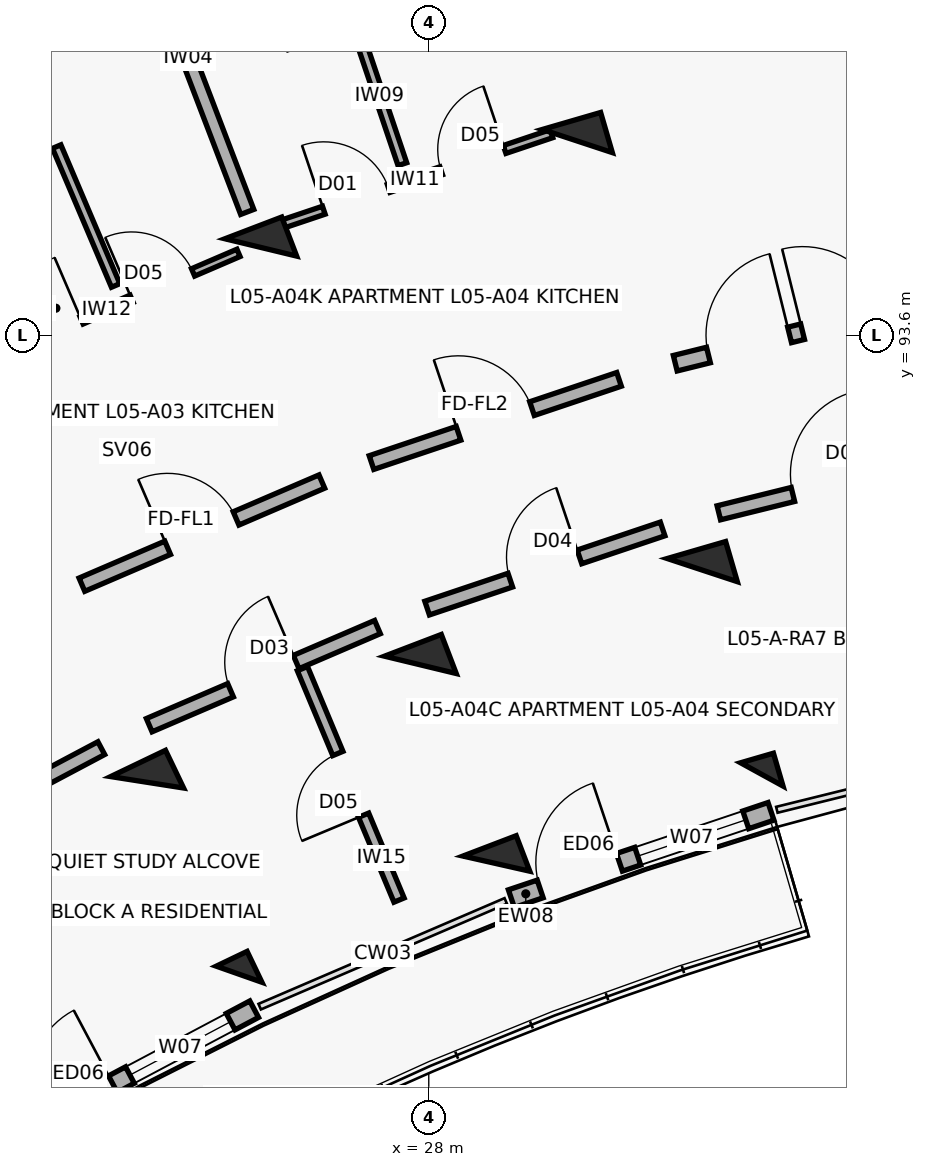
"""IFC4 building model, lengths in metres.
Left out: names, types, materials, properties, quantities, classifications, styles, units other than length and angle.
Written with IfcOpenShell. Run it as: python <this file> out.ifc"""

import sys

from ifc_helpers import new_model, si_unit, direction, frame, frame_2d, origin, origin_2d, place, context, subcontext, project, spatial, rectangle, extrude, element, fill, save


model = new_model("IFC4")
c1 = context("Model", 3, precision=1e-05, world=origin(), true_north=direction((0.0, 1.0)))
c2 = subcontext(c1, "Body", "Model", "MODEL_VIEW")
j1 = project(units=[si_unit("LENGTHUNIT", "METRE"), si_unit("PLANEANGLEUNIT", "RADIAN")], contexts=[c1])
p1 = place(None, origin())
s1 = spatial("IfcSite", under=j1, at=p1, CompositionType="ELEMENT")
p2 = place(p1, origin())
s2 = spatial("IfcBuilding", under=s1, at=p2, CompositionType="ELEMENT")
p3 = place(p2, frame((0.0, 0.0, 17.4)))
s3 = spatial("IfcBuildingStorey", under=s2, at=p3, CompositionType="ELEMENT", Elevation=17.4)
p4 = place(p3, frame((25.504, 85.191, 0.0), z_axis=(0.0, 0.0, 1.0), x_axis=(-0.432085748802, 0.901832526405, 0.0)))
e1 = element("IfcColumn", 1, at=p4, inside=s3, PredefinedType="COLUMN", context=c2, shape_type="SweptSolid", body=[
    extrude(rectangle(XDim=0.45, YDim=0.45, at=origin_2d()), origin(), (0.0, 0.0, 1.0), 3.1),
])
p5 = place(p3, frame((24.294, 87.716, 0.0), z_axis=(0.0, 0.0, 1.0), x_axis=(-0.432085748802, 0.901832526405, 0.0)))
e2 = element("IfcColumn", 2, at=p5, inside=s3, PredefinedType="COLUMN", context=c2, shape_type="SweptSolid", body=[
    extrude(rectangle(XDim=0.55, YDim=0.8, at=origin_2d()), origin(), (0.0, 0.0, 1.0), 3.1),
])
p6 = place(p3, frame((28.889, 86.646, 0.0), z_axis=(0.0, 0.0, 1.0), x_axis=(-0.357064076459, 0.934079892355, 0.0)))
e3 = element("IfcColumn", 3, at=p6, inside=s3, PredefinedType="COLUMN", context=c2, shape_type="SweptSolid", body=[
    extrude(rectangle(XDim=0.5, YDim=0.75, at=origin_2d()), origin(), (0.0, 0.0, 1.0), 3.1),
])
for number, where, z_axis, x_axis in (
    (4, (27.889, 89.261, 0.0), (0.0, 0.0, 1.0), (-0.357, 0.934, 0.0)),
    (5, (25.79, 94.753, 0.0), (0.0, 0.0, 1.0), (-0.357, 0.934, 0.0)),
):
    element("IfcColumn", number, at=place(p3, frame(where, z_axis=z_axis, x_axis=x_axis)), inside=s3, PredefinedType="COLUMN", context=c2, shape_type="SweptSolid", body=[
        extrude(rectangle(XDim=0.55, YDim=0.8, at=origin_2d()), origin(), (0.0, 0.0, 1.0), 3.1),
    ])
p7 = place(p3, frame((32.382, 87.82, 0.0), z_axis=(0.0, 0.0, 1.0), x_axis=(-0.27966144946, 0.96009867914, 0.0)))
e6 = element("IfcColumn", 6, at=p7, inside=s3, PredefinedType="COLUMN", context=c2, shape_type="SweptSolid", body=[
    extrude(rectangle(XDim=0.45, YDim=0.45, at=origin_2d()), origin(), (0.0, 0.0, 1.0), 3.1),
])
for number, where, z_axis, x_axis in (
    (7, (31.599, 90.508, 0.0), (0.0, 0.0, 1.0), (-0.28, 0.96, 0.0)),
    (8, (29.954, 96.153, 0.0), (0.0, 0.0, 1.0), (-0.28, 0.96, 0.0)),
):
    element("IfcColumn", number, at=place(p3, frame(where, z_axis=z_axis, x_axis=x_axis)), inside=s3, PredefinedType="COLUMN", context=c2, shape_type="SweptSolid", body=[
        extrude(rectangle(XDim=0.55, YDim=0.8, at=origin_2d()), origin(), (0.0, 0.0, 1.0), 3.1),
    ])
p8 = place(p3, frame((22.519, 83.042, 0.0), z_axis=(0.0, 0.0, 1.0), x_axis=(0.883438308286, 0.468547495407, 0.0)))
e9 = element("IfcWall", 9, at=p8, inside=s3, PredefinedType="SOLIDWALL", context=c2, shape_type="SweptSolid", body=[
    extrude(rectangle(XDim=3.604, YDim=0.245, at=frame_2d((1.802, 0.0))), origin(), (0.0, 0.0, 1.0), 2.25),
])
p9 = place(p8, frame((0.4, 0.0, 0.0)))
e10 = element("IfcOpeningElement", 10, at=p9, cuts=e9, PredefinedType="OPENING", context=c2, shape_type="SweptSolid", body=[
    extrude(rectangle(XDim=1.1, YDim=2.15, at=frame_2d((0.55, 1.075))), frame((0.0, 0.133, 0.0), z_axis=(0.0, -1.0, 0.0), x_axis=(1.0, 0.0, 0.0)), (0.0, 0.0, 1.0), 0.265),
])
p10 = place(p8, frame((1.754, 0.0, 0.35)))
e11 = element("IfcOpeningElement", 11, at=p10, cuts=e9, PredefinedType="OPENING", context=c2, shape_type="SweptSolid", body=[
    extrude(rectangle(XDim=1.5, YDim=1.65, at=frame_2d((0.75, 0.825))), frame((0.0, 0.133, 0.0), z_axis=(0.0, -1.0, 0.0), x_axis=(1.0, 0.0, 0.0)), (0.0, 0.0, 1.0), 0.265),
])
p11 = place(p3, frame((29.087, 86.185, 0.0), z_axis=(0.0, 0.0, 1.0), x_axis=(0.947880824442, 0.318625081649, 0.0)))
e12 = element("IfcWall", 12, at=p11, inside=s3, PredefinedType="SOLIDWALL", context=c2, shape_type="SweptSolid", body=[
    extrude(rectangle(XDim=3.604, YDim=0.245, at=frame_2d((1.802, 0.0))), origin(), (0.0, 0.0, 1.0), 2.25),
])
p12 = place(p11, frame((0.4, 0.0, 0.0)))
e13 = element("IfcOpeningElement", 13, at=p12, cuts=e12, PredefinedType="OPENING", context=c2, shape_type="SweptSolid", body=[
    extrude(rectangle(XDim=1.1, YDim=2.15, at=frame_2d((0.55, 1.075))), frame((0.0, 0.133, 0.0), z_axis=(0.0, -1.0, 0.0), x_axis=(1.0, 0.0, 0.0)), (0.0, 0.0, 1.0), 0.265),
])
p13 = place(p11, frame((1.754, 0.0, 0.35)))
e14 = element("IfcOpeningElement", 14, at=p13, cuts=e12, PredefinedType="OPENING", context=c2, shape_type="SweptSolid", body=[
    extrude(rectangle(XDim=1.5, YDim=1.65, at=frame_2d((0.75, 0.825))), frame((0.0, 0.133, 0.0), z_axis=(0.0, -1.0, 0.0), x_axis=(1.0, 0.0, 0.0)), (0.0, 0.0, 1.0), 0.265),
])
p14 = place(p3, frame((20.804, 86.634, 0.0), z_axis=(0.0, 0.0, 1.0), x_axis=(0.883444301944, 0.468536194293, 0.0)))
e15 = element("IfcWall", 15, at=p14, inside=s3, PredefinedType="SOLIDWALL", context=c2, shape_type="SweptSolid", body=[
    extrude(rectangle(XDim=3.269, YDim=0.19, at=frame_2d((1.634, 0.0))), origin(), (0.0, 0.0, 1.0), 2.08),
])
p15 = place(p14, frame((1.174, 0.0, 0.0)))
e16 = element("IfcOpeningElement", 16, at=p15, cuts=e15, PredefinedType="OPENING", context=c2, shape_type="SweptSolid", body=[
    extrude(rectangle(XDim=0.92, YDim=2.1, at=frame_2d((0.46, 1.05))), frame((0.0, 0.105, 0.0), z_axis=(0.0, -1.0, 0.0), x_axis=(1.0, 0.0, 0.0)), (0.0, 0.0, 1.0), 0.21),
])
p16 = place(p3, frame((23.437, 90.316, 0.0), z_axis=(0.0, 0.0, 1.0), x_axis=(0.918718172399, 0.394913813008, 0.0)))
e17 = element("IfcWall", 17, at=p16, inside=s3, PredefinedType="SOLIDWALL", context=c2, shape_type="SweptSolid", body=[
    extrude(rectangle(XDim=3.436, YDim=0.19, at=frame_2d((1.718, 0.0))), origin(), (0.0, 0.0, 1.0), 2.08),
])
p17 = place(p16, frame((1.228, 0.0, 0.0)))
e18 = element("IfcOpeningElement", 18, at=p17, cuts=e17, PredefinedType="OPENING", context=c2, shape_type="SweptSolid", body=[
    extrude(rectangle(XDim=0.98, YDim=2.15, at=frame_2d((0.49, 1.075))), frame((0.0, 0.105, 0.0), z_axis=(0.0, -1.0, 0.0), x_axis=(1.0, 0.0, 0.0)), (0.0, 0.0, 1.0), 0.21),
])
p18 = place(p3, frame((24.322, 88.467, 0.0), z_axis=(0.0, 0.0, 1.0), x_axis=(0.918723391052, 0.394901672235, 0.0)))
e19 = element("IfcWall", 19, at=p18, inside=s3, PredefinedType="SOLIDWALL", context=c2, shape_type="SweptSolid", body=[
    extrude(rectangle(XDim=3.269, YDim=0.19, at=frame_2d((1.634, 0.0))), origin(), (0.0, 0.0, 1.0), 2.08),
])
p19 = place(p18, frame((1.164, 0.0, 0.0)))
e20 = element("IfcOpeningElement", 20, at=p19, cuts=e19, PredefinedType="OPENING", context=c2, shape_type="SweptSolid", body=[
    extrude(rectangle(XDim=0.94, YDim=2.1, at=frame_2d((0.47, 1.05))), frame((0.0, 0.105, 0.0), z_axis=(0.0, -1.0, 0.0), x_axis=(1.0, 0.0, 0.0)), (0.0, 0.0, 1.0), 0.21),
])
p20 = place(p3, frame((27.609, 86.166, 0.0), z_axis=(0.0, 0.0, 1.0), x_axis=(-0.385151143297, 0.922853507777, 0.0)))
e21 = element("IfcWall", 21, at=p20, inside=s3, PredefinedType="PARTITIONING", context=c2, shape_type="SweptSolid", body=[
    extrude(rectangle(XDim=3.3, YDim=0.145, at=frame_2d((1.65, 0.0))), origin(), (0.0, 0.0, 1.0), 2.08),
])
p21 = place(p20, frame((1.21, 0.0, 0.0)))
e22 = element("IfcOpeningElement", 22, at=p21, cuts=e21, PredefinedType="OPENING", context=c2, shape_type="SweptSolid", body=[
    extrude(rectangle(XDim=0.88, YDim=2.1, at=frame_2d((0.44, 1.05))), frame((0.0, 0.083, 0.0), z_axis=(0.0, -1.0, 0.0), x_axis=(1.0, 0.0, 0.0)), (0.0, 0.0, 1.0), 0.165),
])
p22 = place(p3, frame((22.008, 93.182, 0.0), z_axis=(0.0, 0.0, 1.0), x_axis=(0.918732171064, 0.394881245253, 0.0)))
e23 = element("IfcWall", 23, at=p22, inside=s3, PredefinedType="PARTITIONING", context=c2, shape_type="SweptSolid", body=[
    extrude(rectangle(XDim=3.797, YDim=0.105, at=frame_2d((1.899, 0.0))), origin(), (0.0, 0.0, 1.0), 2.08),
])
p23 = place(p22, frame((0.65, 0.0, 0.0)))
e24 = element("IfcOpeningElement", 24, at=p23, cuts=e23, PredefinedType="OPENING", context=c2, shape_type="SweptSolid", body=[
    extrude(rectangle(XDim=0.9, YDim=2.1, at=frame_2d((0.45, 1.05))), frame((0.0, 0.062, 0.0), z_axis=(0.0, -1.0, 0.0), x_axis=(1.0, 0.0, 0.0)), (0.0, 0.0, 1.0), 0.125),
])
p24 = place(p22, frame((2.267, 0.0, 0.0)))
e25 = element("IfcOpeningElement", 25, at=p24, cuts=e23, PredefinedType="OPENING", context=c2, shape_type="SweptSolid", body=[
    extrude(rectangle(XDim=0.88, YDim=2.1, at=frame_2d((0.44, 1.05))), frame((0.0, 0.062, 0.0), z_axis=(0.0, -1.0, 0.0), x_axis=(1.0, 0.0, 0.0)), (0.0, 0.0, 1.0), 0.125),
])
p25 = place(p3, frame((23.88, 94.253, 0.0), z_axis=(0.0, 0.0, 1.0), x_axis=(-0.39076607415, 0.920490019116, 0.0)))
e26 = element("IfcWall", 26, at=p25, inside=s3, PredefinedType="PARTITIONING", context=c2, shape_type="SweptSolid", body=[
    extrude(rectangle(XDim=4.9, YDim=0.12, at=frame_2d((2.45, 0.0))), origin(), (0.0, 0.0, 1.0), 2.08),
])
p26 = place(p25, frame((1.985, 0.0, 0.0)))
e27 = element("IfcOpeningElement", 27, at=p26, cuts=e26, PredefinedType="OPENING", context=c2, shape_type="SweptSolid", body=[
    extrude(rectangle(XDim=0.93, YDim=2.1, at=frame_2d((0.465, 1.05))), frame((0.0, 0.07, 0.0), z_axis=(0.0, -1.0, 0.0), x_axis=(1.0, 0.0, 0.0)), (0.0, 0.0, 1.0), 0.14),
])
p27 = place(p3, frame((27.247, 91.923, 0.0), z_axis=(0.0, 0.0, 1.0), x_axis=(0.947863007629, 0.318678080151, 0.0)))
e28 = element("IfcWall", 28, at=p27, inside=s3, PredefinedType="SOLIDWALL", context=c2, shape_type="SweptSolid", body=[
    extrude(rectangle(XDim=3.436, YDim=0.19, at=frame_2d((1.718, 0.0))), origin(), (0.0, 0.0, 1.0), 2.08),
])
p28 = place(p27, frame((1.208, 0.0, 0.0)))
e29 = element("IfcOpeningElement", 29, at=p28, cuts=e28, PredefinedType="OPENING", context=c2, shape_type="SweptSolid", body=[
    extrude(rectangle(XDim=1.02, YDim=2.15, at=frame_2d((0.51, 1.075))), frame((0.0, 0.105, 0.0), z_axis=(0.0, -1.0, 0.0), x_axis=(1.0, 0.0, 0.0)), (0.0, 0.0, 1.0), 0.21),
])
p29 = place(p3, frame((27.979, 90.008, 0.0), z_axis=(0.0, 0.0, 1.0), x_axis=(0.94787351033, 0.318646839643, 0.0)))
e30 = element("IfcWall", 30, at=p29, inside=s3, PredefinedType="SOLIDWALL", context=c2, shape_type="SweptSolid", body=[
    extrude(rectangle(XDim=3.269, YDim=0.19, at=frame_2d((1.634, 0.0))), origin(), (0.0, 0.0, 1.0), 2.08),
])
p30 = place(p29, frame((1.154, 0.0, 0.0)))
e31 = element("IfcOpeningElement", 31, at=p30, cuts=e30, PredefinedType="OPENING", context=c2, shape_type="SweptSolid", body=[
    extrude(rectangle(XDim=0.96, YDim=2.1, at=frame_2d((0.48, 1.05))), frame((0.0, 0.105, 0.0), z_axis=(0.0, -1.0, 0.0), x_axis=(1.0, 0.0, 0.0)), (0.0, 0.0, 1.0), 0.21),
])
p31 = place(p3, frame((26.003, 95.036, 0.0), z_axis=(0.0, 0.0, 1.0), x_axis=(0.947879193428, 0.318629933725, 0.0)))
e32 = element("IfcWall", 32, at=p31, inside=s3, PredefinedType="PARTITIONING", context=c2, shape_type="SweptSolid", body=[
    extrude(rectangle(XDim=3.81, YDim=0.11, at=frame_2d((1.905, 0.0))), origin(), (0.0, 0.0, 1.0), 2.08),
])
p32 = place(p31, frame((0.65, 0.0, 0.0)))
e33 = element("IfcOpeningElement", 33, at=p32, cuts=e32, PredefinedType="OPENING", context=c2, shape_type="SweptSolid", body=[
    extrude(rectangle(XDim=0.9, YDim=2.1, at=frame_2d((0.45, 1.05))), frame((0.0, 0.065, 0.0), z_axis=(0.0, -1.0, 0.0), x_axis=(1.0, 0.0, 0.0)), (0.0, 0.0, 1.0), 0.13),
])
p33 = place(p31, frame((2.28, 0.0, 0.0)))
e34 = element("IfcOpeningElement", 34, at=p33, cuts=e32, PredefinedType="OPENING", context=c2, shape_type="SweptSolid", body=[
    extrude(rectangle(XDim=0.88, YDim=2.1, at=frame_2d((0.44, 1.05))), frame((0.0, 0.065, 0.0), z_axis=(0.0, -1.0, 0.0), x_axis=(1.0, 0.0, 0.0)), (0.0, 0.0, 1.0), 0.13),
])
p34 = place(p3, frame((27.653, 95.849, 0.0), z_axis=(0.0, 0.0, 1.0), x_axis=(-0.320049134076, 0.947400945628, 0.0)))
e35 = element("IfcWall", 35, at=p34, inside=s3, PredefinedType="PARTITIONING", context=c2, shape_type="SweptSolid", body=[
    extrude(rectangle(XDim=4.75, YDim=0.12, at=frame_2d((2.375, 0.0))), origin(), (0.0, 0.0, 1.0), 2.08),
])
p35 = place(p34, frame((1.89, 0.0, 0.0)))
e36 = element("IfcOpeningElement", 36, at=p35, cuts=e35, PredefinedType="OPENING", context=c2, shape_type="SweptSolid", body=[
    extrude(rectangle(XDim=0.97, YDim=2.1, at=frame_2d((0.485, 1.05))), frame((0.0, 0.07, 0.0), z_axis=(0.0, -1.0, 0.0), x_axis=(1.0, 0.0, 0.0)), (0.0, 0.0, 1.0), 0.14),
])
p36 = place(p3, frame((25.611, 95.22, 0.0), z_axis=(0.0, 0.0, 1.0), x_axis=(-0.357064016205, 0.934079915388, 0.0)))
e37 = element("IfcWall", 37, at=p36, inside=s3, PredefinedType="SOLIDWALL", context=c2, shape_type="SweptSolid", body=[
    extrude(rectangle(XDim=4.35, YDim=0.185, at=frame_2d((2.175, 0.0))), origin(), (0.0, 0.0, 1.0), 2.08),
])
p37 = place(p3, frame((31.243, 93.23, 0.0), z_axis=(0.0, 0.0, 1.0), x_axis=(0.970719238682, 0.240216901263, 0.0)))
e38 = element("IfcWall", 38, at=p37, inside=s3, PredefinedType="SOLIDWALL", context=c2, shape_type="SweptSolid", body=[
    extrude(rectangle(XDim=3.296, YDim=0.21, at=frame_2d((1.648, 0.0))), origin(), (0.0, 0.0, 1.0), 2.08),
])
p38 = place(p37, frame((0.45, 0.0, 0.0)))
e39 = element("IfcOpeningElement", 39, at=p38, cuts=e38, PredefinedType="OPENING", context=c2, shape_type="SweptSolid", body=[
    extrude(rectangle(XDim=1.1, YDim=2.15, at=frame_2d((0.55, 1.075))), frame((0.0, 0.115, 0.0), z_axis=(0.0, -1.0, 0.0), x_axis=(1.0, 0.0, 0.0)), (0.0, 0.0, 1.0), 0.23),
])
p39 = place(p37, frame((1.726, 0.0, 0.0)))
e40 = element("IfcOpeningElement", 40, at=p39, cuts=e38, PredefinedType="OPENING", context=c2, shape_type="SweptSolid", body=[
    extrude(rectangle(XDim=1.12, YDim=2.15, at=frame_2d((0.56, 1.075))), frame((0.0, 0.115, 0.0), z_axis=(0.0, -1.0, 0.0), x_axis=(1.0, 0.0, 0.0)), (0.0, 0.0, 1.0), 0.23),
])
p40 = place(p3, frame((31.816, 91.262, 0.0), z_axis=(0.0, 0.0, 1.0), x_axis=(0.970727194092, 0.240184751078, 0.0)))
e41 = element("IfcWall", 41, at=p40, inside=s3, PredefinedType="SOLIDWALL", context=c2, shape_type="SweptSolid", body=[
    extrude(rectangle(XDim=3.129, YDim=0.19, at=frame_2d((1.564, 0.0))), origin(), (0.0, 0.0, 1.0), 2.08),
])
p41 = place(p40, frame((1.004, 0.0, 0.0)))
e42 = element("IfcOpeningElement", 42, at=p41, cuts=e41, PredefinedType="OPENING", context=c2, shape_type="SweptSolid", body=[
    extrude(rectangle(XDim=1.12, YDim=2.15, at=frame_2d((0.56, 1.075))), frame((0.0, 0.105, 0.0), z_axis=(0.0, -1.0, 0.0), x_axis=(1.0, 0.0, 0.0)), (0.0, 0.0, 1.0), 0.21),
])
p42 = place(p9, origin())
e43 = element("IfcDoor", 43, at=p42, inside=s3, OperationType="SINGLE_SWING_RIGHT", PredefinedType="DOOR", context=c2, shape_type="SweptSolid", body=[
    extrude(rectangle(XDim=1.1, YDim=2.15, at=frame_2d((0.55, 1.075))), frame((0.0, 0.025, 0.0), z_axis=(0.0, -1.0, 0.0), x_axis=(1.0, 0.0, 0.0)), (0.0, 0.0, 1.0), 0.05),
])
fill(e10, e43)
p43 = place(p10, origin())
e44 = element("IfcWindow", 44, at=p43, inside=s3, PartitioningType="DOUBLE_PANEL_VERTICAL", PredefinedType="WINDOW", context=c2, shape_type="SweptSolid", body=[
    extrude(rectangle(XDim=1.5, YDim=1.65, at=frame_2d((0.75, 0.825))), frame((0.0, 0.03, 0.0), z_axis=(0.0, -1.0, 0.0), x_axis=(1.0, 0.0, 0.0)), (0.0, 0.0, 1.0), 0.06),
])
fill(e11, e44)
p44 = place(p12, origin())
e45 = element("IfcDoor", 45, at=p44, inside=s3, OperationType="SINGLE_SWING_RIGHT", PredefinedType="DOOR", context=c2, shape_type="SweptSolid", body=[
    extrude(rectangle(XDim=1.1, YDim=2.15, at=frame_2d((0.55, 1.075))), frame((0.0, 0.025, 0.0), z_axis=(0.0, -1.0, 0.0), x_axis=(1.0, 0.0, 0.0)), (0.0, 0.0, 1.0), 0.05),
])
fill(e13, e45)
p45 = place(p13, origin())
e46 = element("IfcWindow", 46, at=p45, inside=s3, PartitioningType="DOUBLE_PANEL_VERTICAL", PredefinedType="WINDOW", context=c2, shape_type="SweptSolid", body=[
    extrude(rectangle(XDim=1.5, YDim=1.65, at=frame_2d((0.75, 0.825))), frame((0.0, 0.03, 0.0), z_axis=(0.0, -1.0, 0.0), x_axis=(1.0, 0.0, 0.0)), (0.0, 0.0, 1.0), 0.06),
])
fill(e14, e46)
p46 = place(p17, origin())
e47 = element("IfcDoor", 47, at=p46, inside=s3, OperationType="SINGLE_SWING_LEFT", PredefinedType="DOOR", context=c2, shape_type="SweptSolid", body=[
    extrude(rectangle(XDim=0.98, YDim=2.15, at=frame_2d((0.49, 1.075))), frame((0.0, 0.025, 0.0), z_axis=(0.0, -1.0, 0.0), x_axis=(1.0, 0.0, 0.0)), (0.0, 0.0, 1.0), 0.05),
])
fill(e18, e47)
p47 = place(p19, origin())
e48 = element("IfcDoor", 48, at=p47, inside=s3, OperationType="SINGLE_SWING_RIGHT", PredefinedType="DOOR", context=c2, shape_type="SweptSolid", body=[
    extrude(rectangle(XDim=0.94, YDim=2.1, at=frame_2d((0.47, 1.05))), frame((0.0, 0.025, 0.0), z_axis=(0.0, -1.0, 0.0), x_axis=(1.0, 0.0, 0.0)), (0.0, 0.0, 1.0), 0.05),
])
fill(e20, e48)
p48 = place(p21, origin())
e49 = element("IfcDoor", 49, at=p48, inside=s3, OperationType="SINGLE_SWING_LEFT", PredefinedType="DOOR", context=c2, shape_type="SweptSolid", body=[
    extrude(rectangle(XDim=0.88, YDim=2.1, at=frame_2d((0.44, 1.05))), frame((0.0, 0.025, 0.0), z_axis=(0.0, -1.0, 0.0), x_axis=(1.0, 0.0, 0.0)), (0.0, 0.0, 1.0), 0.05),
])
fill(e22, e49)
p49 = place(p23, origin())
e50 = element("IfcDoor", 50, at=p49, inside=s3, OperationType="SINGLE_SWING_RIGHT", PredefinedType="DOOR", context=c2, shape_type="SweptSolid", body=[
    extrude(rectangle(XDim=0.9, YDim=2.1, at=frame_2d((0.45, 1.05))), frame((0.0, 0.025, 0.0), z_axis=(0.0, -1.0, 0.0), x_axis=(1.0, 0.0, 0.0)), (0.0, 0.0, 1.0), 0.05),
])
fill(e24, e50)
p50 = place(p24, origin())
e51 = element("IfcDoor", 51, at=p50, inside=s3, OperationType="SINGLE_SWING_LEFT", PredefinedType="DOOR", context=c2, shape_type="SweptSolid", body=[
    extrude(rectangle(XDim=0.88, YDim=2.1, at=frame_2d((0.44, 1.05))), frame((0.0, 0.025, 0.0), z_axis=(0.0, -1.0, 0.0), x_axis=(1.0, 0.0, 0.0)), (0.0, 0.0, 1.0), 0.05),
])
fill(e25, e51)
p51 = place(p26, origin())
e52 = element("IfcDoor", 52, at=p51, inside=s3, OperationType="SINGLE_SWING_RIGHT", PredefinedType="DOOR", context=c2, shape_type="SweptSolid", body=[
    extrude(rectangle(XDim=0.93, YDim=2.1, at=frame_2d((0.465, 1.05))), frame((0.0, 0.025, 0.0), z_axis=(0.0, -1.0, 0.0), x_axis=(1.0, 0.0, 0.0)), (0.0, 0.0, 1.0), 0.05),
])
fill(e27, e52)
p52 = place(p28, origin())
e53 = element("IfcDoor", 53, at=p52, inside=s3, OperationType="SINGLE_SWING_LEFT", PredefinedType="DOOR", context=c2, shape_type="SweptSolid", body=[
    extrude(rectangle(XDim=1.02, YDim=2.15, at=frame_2d((0.51, 1.075))), frame((0.0, 0.025, 0.0), z_axis=(0.0, -1.0, 0.0), x_axis=(1.0, 0.0, 0.0)), (0.0, 0.0, 1.0), 0.05),
])
fill(e29, e53)
p53 = place(p30, origin())
e54 = element("IfcDoor", 54, at=p53, inside=s3, OperationType="SINGLE_SWING_RIGHT", PredefinedType="DOOR", context=c2, shape_type="SweptSolid", body=[
    extrude(rectangle(XDim=0.96, YDim=2.1, at=frame_2d((0.48, 1.05))), frame((0.0, 0.025, 0.0), z_axis=(0.0, -1.0, 0.0), x_axis=(1.0, 0.0, 0.0)), (0.0, 0.0, 1.0), 0.05),
])
fill(e31, e54)
p54 = place(p32, origin())
e55 = element("IfcDoor", 55, at=p54, inside=s3, OperationType="SINGLE_SWING_LEFT", PredefinedType="DOOR", context=c2, shape_type="SweptSolid", body=[
    extrude(rectangle(XDim=0.9, YDim=2.1, at=frame_2d((0.45, 1.05))), frame((0.0, 0.025, 0.0), z_axis=(0.0, -1.0, 0.0), x_axis=(1.0, 0.0, 0.0)), (0.0, 0.0, 1.0), 0.05),
])
fill(e33, e55)
p55 = place(p33, origin())
e56 = element("IfcDoor", 56, at=p55, inside=s3, OperationType="SINGLE_SWING_RIGHT", PredefinedType="DOOR", context=c2, shape_type="SweptSolid", body=[
    extrude(rectangle(XDim=0.88, YDim=2.1, at=frame_2d((0.44, 1.05))), frame((0.0, 0.025, 0.0), z_axis=(0.0, -1.0, 0.0), x_axis=(1.0, 0.0, 0.0)), (0.0, 0.0, 1.0), 0.05),
])
fill(e34, e56)
p56 = place(p38, origin())
e57 = element("IfcDoor", 57, at=p56, inside=s3, OperationType="SINGLE_SWING_RIGHT", PredefinedType="DOOR", context=c2, shape_type="SweptSolid", body=[
    extrude(rectangle(XDim=1.1, YDim=2.15, at=frame_2d((0.55, 1.075))), frame((0.0, 0.025, 0.0), z_axis=(0.0, -1.0, 0.0), x_axis=(1.0, 0.0, 0.0)), (0.0, 0.0, 1.0), 0.05),
])
fill(e39, e57)
p57 = place(p39, origin())
e58 = element("IfcDoor", 58, at=p57, inside=s3, OperationType="SINGLE_SWING_LEFT", PredefinedType="DOOR", context=c2, shape_type="SweptSolid", body=[
    extrude(rectangle(XDim=1.12, YDim=2.15, at=frame_2d((0.56, 1.075))), frame((0.0, 0.025, 0.0), z_axis=(0.0, -1.0, 0.0), x_axis=(1.0, 0.0, 0.0)), (0.0, 0.0, 1.0), 0.05),
])
fill(e40, e58)
p58 = place(p41, origin())
e59 = element("IfcDoor", 59, at=p58, inside=s3, OperationType="SINGLE_SWING_RIGHT", PredefinedType="DOOR", context=c2, shape_type="SweptSolid", body=[
    extrude(rectangle(XDim=1.12, YDim=2.15, at=frame_2d((0.56, 1.075))), frame((0.0, 0.025, 0.0), z_axis=(0.0, -1.0, 0.0), x_axis=(1.0, 0.0, 0.0)), (0.0, 0.0, 1.0), 0.05),
])
fill(e42, e59)
save(model, sys.argv[1])
